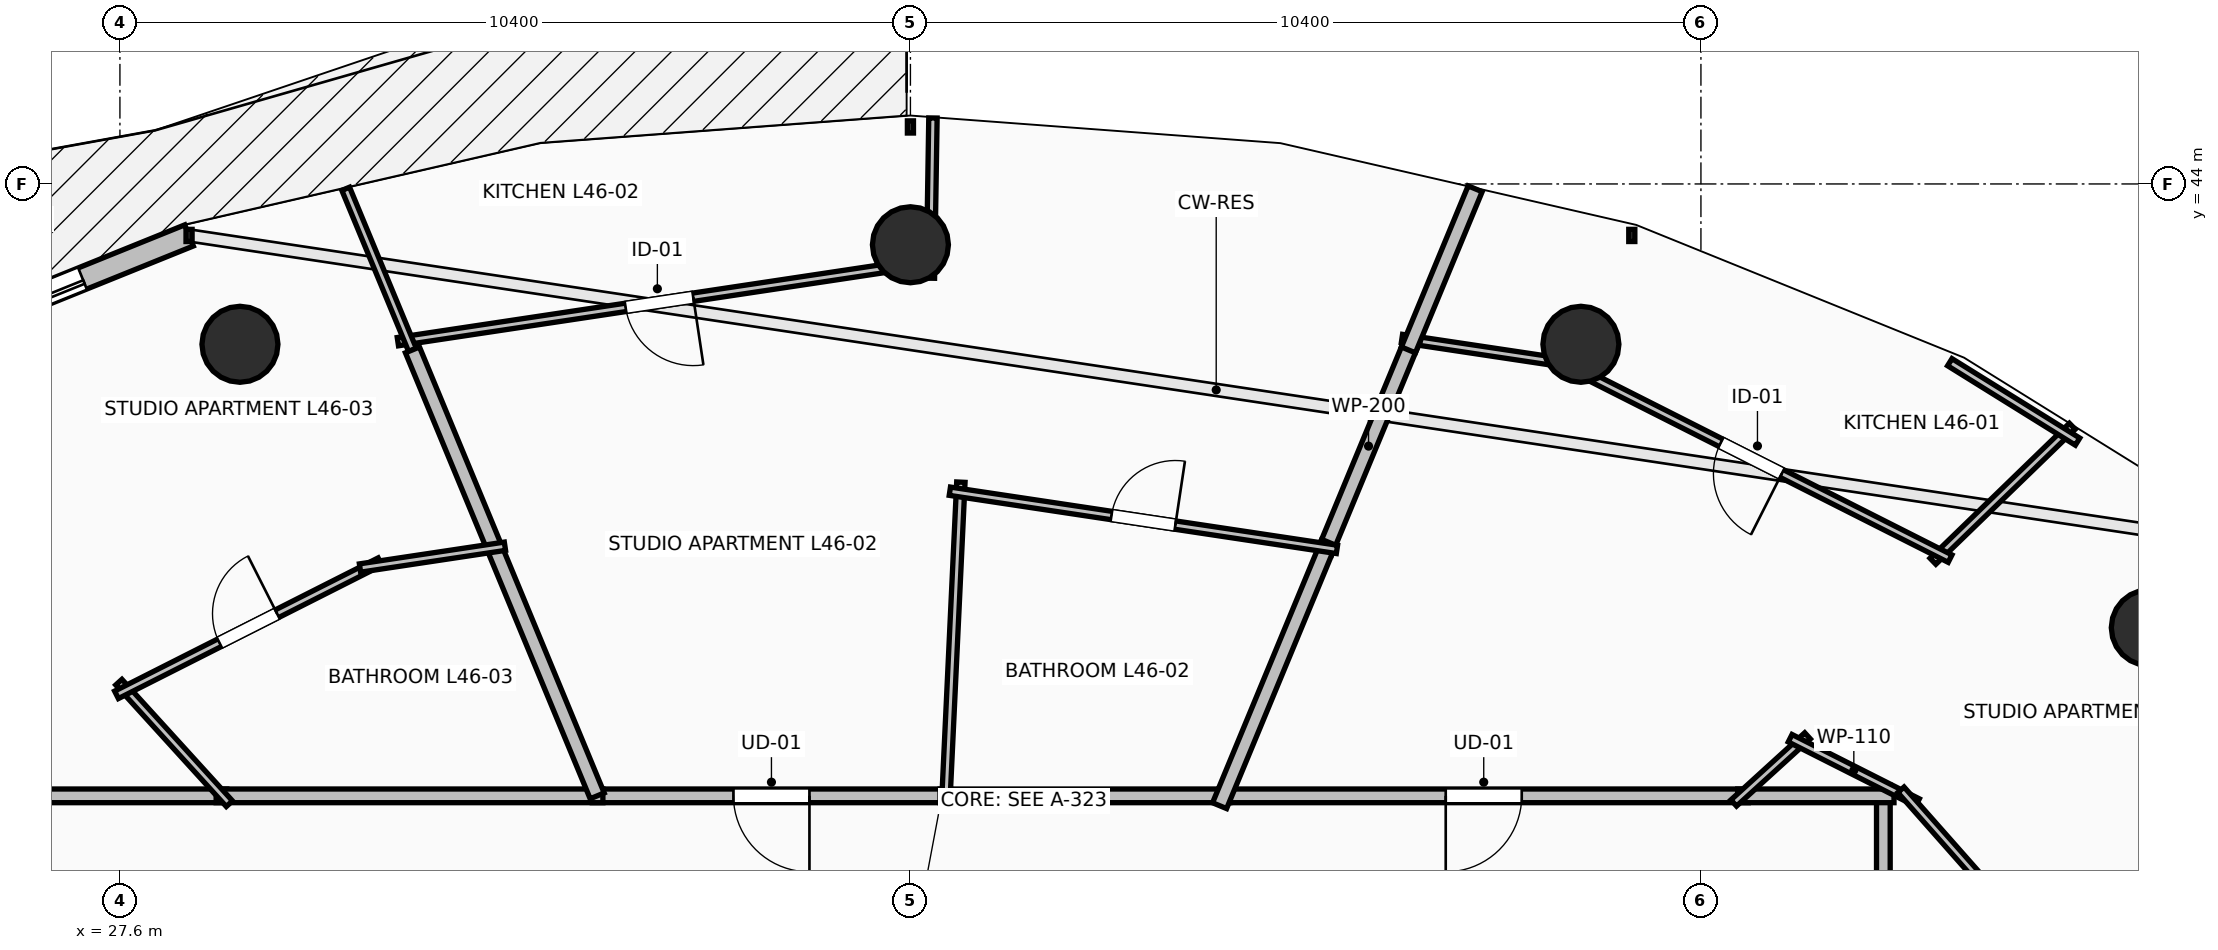
"""IFC4 building model, lengths in metres.
Left out: names, types, materials, properties, quantities, classifications, styles, units other than length and angle.
Written with IfcOpenShell. Run it as: python <this file> out.ifc"""

import sys

from ifc_helpers import new_model, si_unit, direction, frame, frame_2d, origin, origin_2d, place, context, subcontext, project, spatial, rectangle, circle, extrude, element, fill, save


model = new_model("IFC4")
c1 = context("Model", 3, precision=1e-05, world=origin(), true_north=direction((0.0, 1.0)))
c2 = subcontext(c1, "Body", "Model", "MODEL_VIEW")
j1 = project(units=[si_unit("LENGTHUNIT", "METRE"), si_unit("PLANEANGLEUNIT", "RADIAN")], contexts=[c1])
p1 = place(None, origin())
s1 = spatial("IfcSite", under=j1, at=p1, CompositionType="ELEMENT")
p2 = place(p1, origin())
s2 = spatial("IfcBuilding", under=s1, at=p2, CompositionType="ELEMENT")
p3 = place(p2, frame((0.0, 0.0, 171.1)))
s3 = spatial("IfcBuildingStorey", under=s2, at=p3, CompositionType="ELEMENT", Elevation=171.1)
for number, where, z_axis, x_axis in (
    (1, (54.299, 38.162, 0.0), (0.0, 0.0, 1.0), (0.707, 0.707, 0.0)),
    (2, (46.821, 41.891, 0.0), (0.0, 0.0, 1.0), (0.383, 0.924, 0.0)),
    (3, (38.0, 43.2, 0.0), (0.0, 0.0, 1.0), (0.0, 1.0, 0.0)),
    (4, (29.179, 41.891, 0.0), (0.0, 0.0, 1.0), (-0.383, 0.924, 0.0)),
):
    element("IfcColumn", number, at=place(p3, frame(where, z_axis=z_axis, x_axis=x_axis)), inside=s3, PredefinedType="COLUMN", context=c2, shape_type="SweptSolid", body=[
        extrude(circle(Radius=0.5, at=origin_2d()), origin(), (0.0, 0.0, 1.0), 3.5),
    ])
p4 = place(p3, frame((28.51, 43.323, 0.0), z_axis=(0.0, 0.0, 1.0), x_axis=(-0.927156504392, -0.374674280359, 0.0)))
e5 = element("IfcWall", 5, at=p4, inside=s3, PredefinedType="STANDARD", context=c2, shape_type="SweptSolid", body=[
    extrude(rectangle(XDim=4.625, YDim=0.3, at=frame_2d((2.312, 0.0))), origin(), (0.0, 0.0, 1.0), 3.2),
])
p5 = place(p4, frame((1.512, 0.0, 0.0)))
e6 = element("IfcOpeningElement", 6, at=p5, cuts=e5, PredefinedType="OPENING", context=c2, shape_type="SweptSolid", body=[
    extrude(rectangle(XDim=1.6, YDim=2.3, at=frame_2d((0.8, 1.15))), frame((0.0, 0.165, 0.0), z_axis=(0.0, -1.0, 0.0), x_axis=(1.0, 0.0, 0.0)), (0.0, 0.0, 1.0), 0.33),
])
p6 = place(p3, frame((49.024, 35.95, 0.0), z_axis=(0.0, 0.0, 1.0), x_axis=(-1.0, 0.0, 0.0)))
e7 = element("IfcWall", 7, at=p6, inside=s3, PredefinedType="PARTITIONING", context=c2, shape_type="SweptSolid", body=[
    extrude(rectangle(XDim=6.963, YDim=0.18, at=frame_2d((3.481, 0.0))), origin(), (0.0, 0.0, 1.0), 2.392),
])
p7 = place(p6, frame((2.981, 0.0, 0.0)))
e8 = element("IfcOpeningElement", 8, at=p7, cuts=e7, PredefinedType="OPENING", context=c2, shape_type="SweptSolid", body=[
    extrude(rectangle(XDim=1.0, YDim=2.15, at=frame_2d((0.5, 1.075))), frame((0.0, 0.105, 0.0), z_axis=(0.0, -1.0, 0.0), x_axis=(1.0, 0.0, 0.0)), (0.0, 0.0, 1.0), 0.21),
])
p8 = place(p3, frame((50.8, 31.102, 0.0), z_axis=(0.0, 0.0, 1.0), x_axis=(0.0, 1.0, 0.0)))
e9 = element("IfcWall", 9, at=p8, inside=s3, PredefinedType="PARTITIONING", context=c2, shape_type="SweptSolid", body=[
    extrude(rectangle(XDim=4.988, YDim=0.18, at=frame_2d((2.494, 0.0))), origin(), (0.0, 0.0, 1.0), 2.392),
])
p9 = place(p3, frame((50.94, 35.95, 0.0), z_axis=(0.0, 0.0, 1.0), x_axis=(-1.0, 0.0, 0.0)))
e10 = element("IfcWall", 10, at=p9, inside=s3, PredefinedType="PARTITIONING", context=c2, shape_type="SweptSolid", body=[
    extrude(rectangle(XDim=2.056, YDim=0.18, at=frame_2d((1.028, 0.0))), origin(), (0.0, 0.0, 1.0), 2.834),
])
p10 = place(p3, frame((38.529, 35.95, 0.0), z_axis=(0.0, 0.0, 1.0), x_axis=(-1.0, 0.0, 0.0)))
e11 = element("IfcWall", 11, at=p10, inside=s3, PredefinedType="PARTITIONING", context=c2, shape_type="SweptSolid", body=[
    extrude(rectangle(XDim=4.715, YDim=0.18, at=frame_2d((2.357, 0.0))), origin(), (0.0, 0.0, 1.0), 3.2),
])
p11 = place(p10, frame((1.857, 0.0, 0.0)))
e12 = element("IfcOpeningElement", 12, at=p11, cuts=e11, PredefinedType="OPENING", context=c2, shape_type="SweptSolid", body=[
    extrude(rectangle(XDim=1.0, YDim=2.15, at=frame_2d((0.5, 1.075))), frame((0.0, 0.105, 0.0), z_axis=(0.0, -1.0, 0.0), x_axis=(1.0, 0.0, 0.0)), (0.0, 0.0, 1.0), 0.21),
])
p12 = place(p3, frame((42.201, 35.95, 0.0), z_axis=(0.0, 0.0, 1.0), x_axis=(-1.0, 0.0, 0.0)))
e13 = element("IfcWall", 13, at=p12, inside=s3, PredefinedType="PARTITIONING", context=c2, shape_type="SweptSolid", body=[
    extrude(rectangle(XDim=3.812, YDim=0.18, at=frame_2d((1.906, 0.0))), origin(), (0.0, 0.0, 1.0), 3.2),
])
p13 = place(p3, frame((29.006, 35.95, 0.0), z_axis=(0.0, 0.0, 1.0), x_axis=(-1.0, 0.0, 0.0)))
e14 = element("IfcWall", 14, at=p13, inside=s3, PredefinedType="PARTITIONING", context=c2, shape_type="SweptSolid", body=[
    extrude(rectangle(XDim=3.806, YDim=0.18, at=frame_2d((1.903, 0.0))), origin(), (0.0, 0.0, 1.0), 2.392),
])
p14 = place(p3, frame((33.954, 35.95, 0.0), z_axis=(0.0, 0.0, 1.0), x_axis=(-1.0, 0.0, 0.0)))
e15 = element("IfcWall", 15, at=p14, inside=s3, PredefinedType="PARTITIONING", context=c2, shape_type="SweptSolid", body=[
    extrude(rectangle(XDim=5.088, YDim=0.18, at=frame_2d((2.544, 0.0))), origin(), (0.0, 0.0, 1.0), 2.392),
])
p15 = place(p3, frame((48.831, 35.856, 0.0), z_axis=(0.0, 0.0, 1.0), x_axis=(0.739696022243, 0.672941152463, 0.0)))
e16 = element("IfcWall", 16, at=p15, inside=s3, PredefinedType="PARTITIONING", context=c2, shape_type="SweptSolid", body=[
    extrude(rectangle(XDim=1.313, YDim=0.11, at=frame_2d((0.656, 0.0))), origin(), (0.0, 0.0, 1.0), 2.834),
])
p16 = place(p3, frame((49.574, 36.708, 0.0), z_axis=(0.0, 0.0, 1.0), x_axis=(0.8925722309, -0.450904438464, 0.0)))
e17 = element("IfcWall", 17, at=p16, inside=s3, PredefinedType="PARTITIONING", context=c2, shape_type="SweptSolid", body=[
    extrude(rectangle(XDim=1.877, YDim=0.11, at=frame_2d((0.938, 0.0))), origin(), (0.0, 0.0, 1.0), 3.2),
])
p17 = place(p3, frame((51.031, 36.03, 0.0), z_axis=(0.0, 0.0, 1.0), x_axis=(0.662223763999, -0.749306136632, 0.0)))
e18 = element("IfcWall", 18, at=p17, inside=s3, PredefinedType="PARTITIONING", context=c2, shape_type="SweptSolid", body=[
    extrude(rectangle(XDim=4.665, YDim=0.11, at=frame_2d((2.333, 0.0))), origin(), (0.0, 0.0, 1.0), 2.392),
])
p18 = place(p17, frame((1.908, 0.0, 0.0)))
e19 = element("IfcOpeningElement", 19, at=p18, cuts=e18, PredefinedType="OPENING", context=c2, shape_type="SweptSolid", body=[
    extrude(rectangle(XDim=0.85, YDim=2.1, at=frame_2d((0.425, 1.05))), frame((0.0, 0.07, 0.0), z_axis=(0.0, -1.0, 0.0), x_axis=(1.0, 0.0, 0.0)), (0.0, 0.0, 1.0), 0.14),
])
p19 = place(p3, frame((53.286, 40.812, 0.0), z_axis=(0.0, 0.0, 1.0), x_axis=(-0.718256654627, -0.69577825353, 0.0)))
e20 = element("IfcWall", 20, at=p19, inside=s3, PredefinedType="PARTITIONING", context=c2, shape_type="SweptSolid", body=[
    extrude(rectangle(XDim=2.552, YDim=0.11, at=frame_2d((1.276, 0.0))), origin(), (0.0, 0.0, 1.0), 2.688),
])
p20 = place(p3, frame((51.678, 39.071, 0.0), z_axis=(0.0, 0.0, 1.0), x_axis=(-0.892519613246, 0.451008580818, 0.0)))
e21 = element("IfcWall", 21, at=p20, inside=s3, PredefinedType="PARTITIONING", context=c2, shape_type="SweptSolid", body=[
    extrude(rectangle(XDim=5.861, YDim=0.11, at=frame_2d((2.93, 0.0))), origin(), (0.0, 0.0, 1.0), 2.392),
])
p21 = place(p20, frame((2.48, 0.0, 0.0)))
e22 = element("IfcOpeningElement", 22, at=p21, cuts=e21, PredefinedType="OPENING", context=c2, shape_type="SweptSolid", body=[
    extrude(rectangle(XDim=0.9, YDim=2.1, at=frame_2d((0.45, 1.05))), frame((0.0, 0.07, 0.0), z_axis=(0.0, -1.0, 0.0), x_axis=(1.0, 0.0, 0.0)), (0.0, 0.0, 1.0), 0.14),
])
p22 = place(p3, frame((46.71, 41.63, 0.0), z_axis=(0.0, 0.0, 1.0), x_axis=(-0.988930827604, 0.14837728335, 0.0)))
e23 = element("IfcWall", 23, at=p22, inside=s3, PredefinedType="PARTITIONING", context=c2, shape_type="SweptSolid", body=[
    extrude(rectangle(XDim=2.269, YDim=0.11, at=frame_2d((1.135, 0.0))), origin(), (0.0, 0.0, 1.0), 3.2),
])
p23 = place(p3, frame((53.355, 40.61, 0.0), z_axis=(0.0, 0.0, 1.0), x_axis=(-0.8493331579, 0.527857165237, 0.0)))
e24 = element("IfcWall", 24, at=p23, inside=s3, PredefinedType="PARTITIONING", context=c2, shape_type="SweptSolid", body=[
    extrude(rectangle(XDim=1.979, YDim=0.11, at=frame_2d((0.99, 0.0))), origin(), (0.0, 0.0, 1.0), 3.2),
])
p24 = place(p3, frame((44.605, 41.946, 0.0), z_axis=(0.0, 0.0, 1.0), x_axis=(-0.382777783416, -0.923840445382, 0.0)))
e25 = element("IfcWall", 25, at=p24, inside=s3, PredefinedType="PARTITIONING", context=c2, shape_type="SweptSolid", body=[
    extrude(rectangle(XDim=3.02, YDim=0.2, at=frame_2d((1.51, 0.0))), origin(), (0.0, 0.0, 1.0), 2.889),
])
p25 = place(p3, frame((43.503, 39.285, 0.0), z_axis=(0.0, 0.0, 1.0), x_axis=(-0.382867331148, -0.923803337697, 0.0)))
e26 = element("IfcWall", 26, at=p25, inside=s3, PredefinedType="PARTITIONING", context=c2, shape_type="SweptSolid", body=[
    extrude(rectangle(XDim=3.75, YDim=0.2, at=frame_2d((1.875, 0.0))), origin(), (0.0, 0.0, 1.0), 2.834),
])
p26 = place(p3, frame((54.157, 32.692, 0.0), z_axis=(0.0, 0.0, 1.0), x_axis=(0.923898107484, 0.382638585335, 0.0)))
e27 = element("IfcWall", 27, at=p26, inside=s3, PredefinedType="PARTITIONING", context=c2, shape_type="SweptSolid", body=[
    extrude(rectangle(XDim=5.939, YDim=0.2, at=frame_2d((2.97, 0.0))), origin(), (0.0, 0.0, 1.0), 2.392),
])
p27 = place(p3, frame((45.43, 43.936, 0.0), z_axis=(0.0, 0.0, 1.0), x_axis=(-0.382755897173, -0.923849513276, 0.0)))
e28 = element("IfcWall", 28, at=p27, inside=s3, PredefinedType="PARTITIONING", context=c2, shape_type="SweptSolid", body=[
    extrude(rectangle(XDim=2.294, YDim=0.2, at=frame_2d((1.147, 0.0))), origin(), (0.0, 0.0, 1.0), 2.688),
])
p28 = place(p3, frame((38.462, 35.81, 0.0), z_axis=(0.0, 0.0, 1.0), x_axis=(0.047098053516, 0.998890270928, 0.0)))
e29 = element("IfcWall", 29, at=p28, inside=s3, PredefinedType="PARTITIONING", context=c2, shape_type="SweptSolid", body=[
    extrude(rectangle(XDim=4.271, YDim=0.11, at=frame_2d((2.136, 0.0))), origin(), (0.0, 0.0, 1.0), 2.834),
])
p29 = place(p3, frame((38.519, 39.958, 0.0), z_axis=(0.0, 0.0, 1.0), x_axis=(0.988887618714, -0.14866498429, 0.0)))
e30 = element("IfcWall", 30, at=p29, inside=s3, PredefinedType="PARTITIONING", context=c2, shape_type="SweptSolid", body=[
    extrude(rectangle(XDim=5.15, YDim=0.11, at=frame_2d((2.575, 0.0))), origin(), (0.0, 0.0, 1.0), 2.889),
])
p30 = place(p29, frame((2.15, 0.0, 0.0)))
e31 = element("IfcOpeningElement", 31, at=p30, cuts=e30, PredefinedType="OPENING", context=c2, shape_type="SweptSolid", body=[
    extrude(rectangle(XDim=0.85, YDim=2.1, at=frame_2d((0.425, 1.05))), frame((0.0, 0.07, 0.0), z_axis=(0.0, -1.0, 0.0), x_axis=(1.0, 0.0, 0.0)), (0.0, 0.0, 1.0), 0.14),
])
p31 = place(p3, frame((38.296, 44.868, 0.0), z_axis=(0.0, 0.0, 1.0), x_axis=(-0.015865503416, -0.99987413498, 0.0)))
e32 = element("IfcWall", 32, at=p31, inside=s3, PredefinedType="PARTITIONING", context=c2, shape_type="SweptSolid", body=[
    extrude(rectangle(XDim=2.108, YDim=0.11, at=frame_2d((1.054, 0.0))), origin(), (0.0, 0.0, 1.0), 2.688),
])
p32 = place(p3, frame((38.138, 42.961, 0.0), z_axis=(0.0, 0.0, 1.0), x_axis=(-0.988870381513, -0.148779597275, 0.0)))
e33 = element("IfcWall", 33, at=p32, inside=s3, PredefinedType="PARTITIONING", context=c2, shape_type="SweptSolid", body=[
    extrude(rectangle(XDim=6.959, YDim=0.11, at=frame_2d((3.479, 0.0))), origin(), (0.0, 0.0, 1.0), 2.392),
])
p33 = place(p32, frame((3.03, 0.0, 0.0)))
e34 = element("IfcOpeningElement", 34, at=p33, cuts=e33, PredefinedType="OPENING", context=c2, shape_type="SweptSolid", body=[
    extrude(rectangle(XDim=0.9, YDim=2.1, at=frame_2d((0.45, 1.05))), frame((0.0, 0.07, 0.0), z_axis=(0.0, -1.0, 0.0), x_axis=(1.0, 0.0, 0.0)), (0.0, 0.0, 1.0), 0.14),
])
p34 = place(p3, frame((31.448, 41.817, 0.0), z_axis=(0.0, 0.0, 1.0), x_axis=(-0.382755897173, 0.923849513276, 0.0)))
e35 = element("IfcWall", 35, at=p34, inside=s3, PredefinedType="PARTITIONING", context=c2, shape_type="SweptSolid", body=[
    extrude(rectangle(XDim=2.294, YDim=0.11, at=frame_2d((1.147, 0.0))), origin(), (0.0, 0.0, 1.0), 2.688),
])
p35 = place(p3, frame((31.448, 41.817, 0.0), z_axis=(0.0, 0.0, 1.0), x_axis=(0.382730952295, -0.92385984768, 0.0)))
e36 = element("IfcWall", 36, at=p35, inside=s3, PredefinedType="PARTITIONING", context=c2, shape_type="SweptSolid", body=[
    extrude(rectangle(XDim=6.35, YDim=0.2, at=frame_2d((3.175, 0.0))), origin(), (0.0, 0.0, 1.0), 2.392),
])
p36 = place(p3, frame((29.04, 35.846, 0.0), z_axis=(0.0, 0.0, 1.0), x_axis=(-0.672886377769, 0.739745850014, 0.0)))
e37 = element("IfcWall", 37, at=p36, inside=s3, PredefinedType="PARTITIONING", context=c2, shape_type="SweptSolid", body=[
    extrude(rectangle(XDim=2.162, YDim=0.11, at=frame_2d((1.081, 0.0))), origin(), (0.0, 0.0, 1.0), 2.392),
])
p37 = place(p3, frame((27.555, 37.279, 0.0), z_axis=(0.0, 0.0, 1.0), x_axis=(0.892457700076, 0.451131082475, 0.0)))
e38 = element("IfcWall", 38, at=p37, inside=s3, PredefinedType="PARTITIONING", context=c2, shape_type="SweptSolid", body=[
    extrude(rectangle(XDim=3.885, YDim=0.11, at=frame_2d((1.942, 0.0))), origin(), (0.0, 0.0, 1.0), 2.392),
])
p38 = place(p37, frame((1.517, 0.0, 0.0)))
e39 = element("IfcOpeningElement", 39, at=p38, cuts=e38, PredefinedType="OPENING", context=c2, shape_type="SweptSolid", body=[
    extrude(rectangle(XDim=0.85, YDim=2.1, at=frame_2d((0.425, 1.05))), frame((0.0, 0.07, 0.0), z_axis=(0.0, -1.0, 0.0), x_axis=(1.0, 0.0, 0.0)), (0.0, 0.0, 1.0), 0.14),
])
p39 = place(p3, frame((30.759, 38.947, 0.0), z_axis=(0.0, 0.0, 1.0), x_axis=(0.988889867338, 0.148650026153, 0.0)))
e40 = element("IfcWall", 40, at=p39, inside=s3, PredefinedType="PARTITIONING", context=c2, shape_type="SweptSolid", body=[
    extrude(rectangle(XDim=1.928, YDim=0.11, at=frame_2d((0.964, 0.0))), origin(), (0.0, 0.0, 1.0), 2.889),
])
p40 = place(p5, origin())
e41 = element("IfcDoor", 41, at=p40, inside=s3, OperationType="SLIDING_TO_LEFT", PredefinedType="DOOR", context=c2, shape_type="SweptSolid", body=[
    extrude(rectangle(XDim=1.6, YDim=2.3, at=frame_2d((0.8, 1.15))), frame((0.0, 0.025, 0.0), z_axis=(0.0, -1.0, 0.0), x_axis=(1.0, 0.0, 0.0)), (0.0, 0.0, 1.0), 0.05),
])
fill(e6, e41)
p41 = place(p7, origin())
e42 = element("IfcDoor", 42, at=p41, inside=s3, OperationType="SINGLE_SWING_RIGHT", PredefinedType="DOOR", context=c2, shape_type="SweptSolid", body=[
    extrude(rectangle(XDim=1.0, YDim=2.15, at=frame_2d((0.5, 1.075))), frame((0.0, 0.025, 0.0), z_axis=(0.0, -1.0, 0.0), x_axis=(1.0, 0.0, 0.0)), (0.0, 0.0, 1.0), 0.05),
])
fill(e8, e42)
p42 = place(p11, origin())
e43 = element("IfcDoor", 43, at=p42, inside=s3, OperationType="SINGLE_SWING_LEFT", PredefinedType="DOOR", context=c2, shape_type="SweptSolid", body=[
    extrude(rectangle(XDim=1.0, YDim=2.15, at=frame_2d((0.5, 1.075))), frame((0.0, 0.025, 0.0), z_axis=(0.0, -1.0, 0.0), x_axis=(1.0, 0.0, 0.0)), (0.0, 0.0, 1.0), 0.05),
])
fill(e12, e43)
p43 = place(p21, origin())
e44 = element("IfcDoor", 44, at=p43, inside=s3, OperationType="SINGLE_SWING_LEFT", PredefinedType="DOOR", context=c2, shape_type="SweptSolid", body=[
    extrude(rectangle(XDim=0.9, YDim=2.1, at=frame_2d((0.45, 1.05))), frame((0.0, 0.025, 0.0), z_axis=(0.0, -1.0, 0.0), x_axis=(1.0, 0.0, 0.0)), (0.0, 0.0, 1.0), 0.05),
])
fill(e22, e44)
p44 = place(p30, origin())
e45 = element("IfcDoor", 45, at=p44, inside=s3, OperationType="SINGLE_SWING_RIGHT", PredefinedType="DOOR", context=c2, shape_type="SweptSolid", body=[
    extrude(rectangle(XDim=0.85, YDim=2.1, at=frame_2d((0.425, 1.05))), frame((0.0, 0.025, 0.0), z_axis=(0.0, -1.0, 0.0), x_axis=(1.0, 0.0, 0.0)), (0.0, 0.0, 1.0), 0.05),
])
fill(e31, e45)
p45 = place(p33, origin())
e46 = element("IfcDoor", 46, at=p45, inside=s3, OperationType="SINGLE_SWING_LEFT", PredefinedType="DOOR", context=c2, shape_type="SweptSolid", body=[
    extrude(rectangle(XDim=0.9, YDim=2.1, at=frame_2d((0.45, 1.05))), frame((0.0, 0.025, 0.0), z_axis=(0.0, -1.0, 0.0), x_axis=(1.0, 0.0, 0.0)), (0.0, 0.0, 1.0), 0.05),
])
fill(e34, e46)
p46 = place(p38, origin())
e47 = element("IfcDoor", 47, at=p46, inside=s3, OperationType="SINGLE_SWING_RIGHT", PredefinedType="DOOR", context=c2, shape_type="SweptSolid", body=[
    extrude(rectangle(XDim=0.85, YDim=2.1, at=frame_2d((0.425, 1.05))), frame((0.0, 0.025, 0.0), z_axis=(0.0, -1.0, 0.0), x_axis=(1.0, 0.0, 0.0)), (0.0, 0.0, 1.0), 0.05),
])
fill(e39, e47)
save(model, sys.argv[1])
